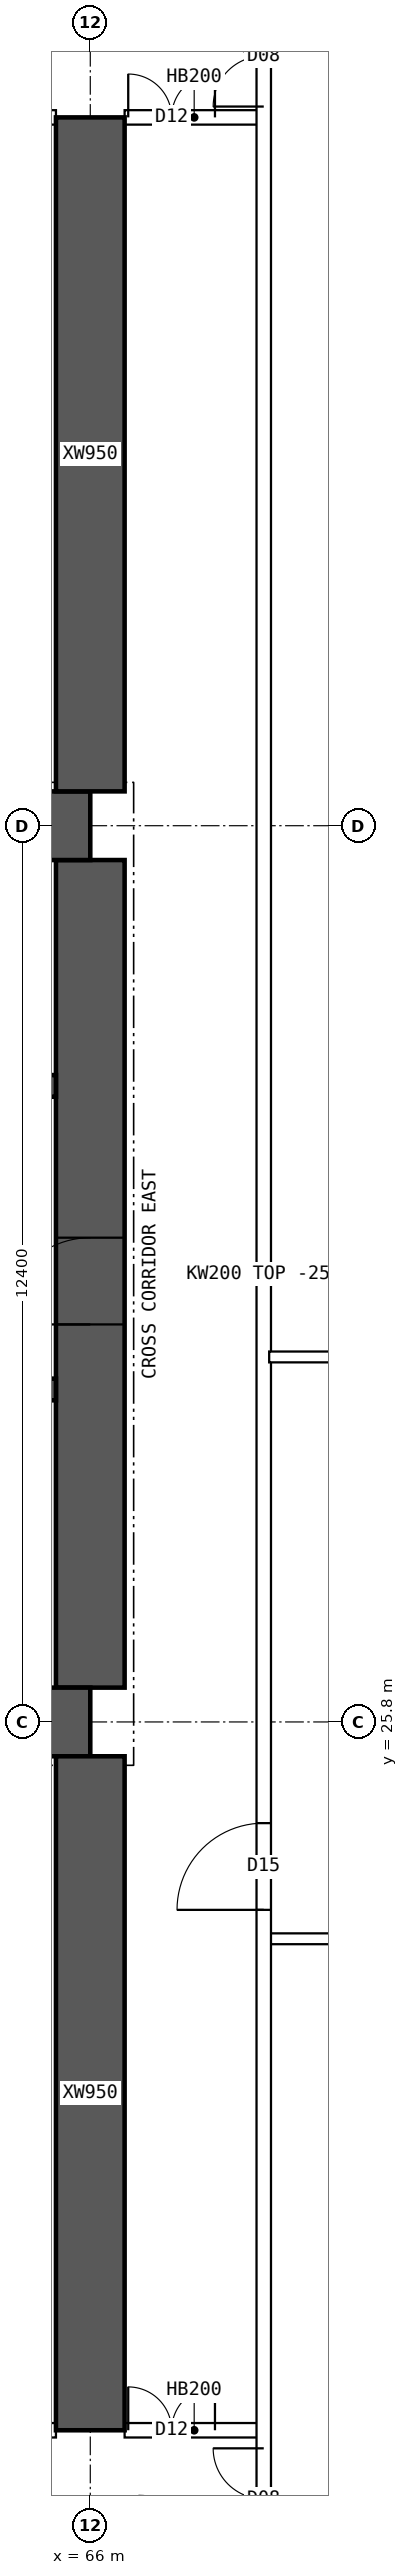
"""IFC4 building model, lengths in metres.
Left out: names, types, materials, properties, quantities, classifications, styles, units other than length and angle.
Written with IfcOpenShell. Run it as: python <this file> out.ifc"""

import sys

from ifc_helpers import new_model, si_unit, direction, frame, frame_2d, origin, place, context, subcontext, project, spatial, polyline, rectangle, outline, extrude, element, fill, save


model = new_model("IFC4")
c1 = context("Model", 3, precision=1e-05, world=origin(), true_north=direction((0.0, 1.0)))
c2 = subcontext(c1, "Body", "Model", "MODEL_VIEW")
j1 = project(units=[si_unit("LENGTHUNIT", "METRE"), si_unit("PLANEANGLEUNIT", "RADIAN")], contexts=[c1])
p1 = place(None, origin())
s1 = spatial("IfcSite", under=j1, at=p1, CompositionType="ELEMENT")
p2 = place(p1, origin())
s2 = spatial("IfcBuilding", under=s1, at=p2, CompositionType="ELEMENT")
p3 = place(p2, frame((0.0, 0.0, 121.9)))
s3 = spatial("IfcBuildingStorey", under=s2, at=p3, CompositionType="ELEMENT", Elevation=121.9)
for number, where, z_axis, x_axis in (
    (1, (18.0, 25.8, 0.0), (0.0, 0.0, 1.0), (1.0, 0.0, 0.0)),
    (2, (18.0, 38.2, 0.0), (0.0, 0.0, 1.0), (1.0, 0.0, 0.0)),
):
    element("IfcWall", number, at=place(p3, frame(where, z_axis=z_axis, x_axis=x_axis)), inside=s3, PredefinedType="SHEAR", context=c2, shape_type="SweptSolid", body=[
        extrude(rectangle(XDim=48.0, YDim=0.95, at=frame_2d((24.0, 0.0))), origin(), (0.0, 0.0, 1.0), 3.75),
    ])
p4 = place(p3, frame((66.0, 26.275, 0.0), z_axis=(0.0, 0.0, 1.0), x_axis=(0.0, 1.0, 0.0)))
e3 = element("IfcWall", 3, at=p4, inside=s3, PredefinedType="SHEAR", context=c2, shape_type="SweptSolid", body=[
    extrude(rectangle(XDim=11.45, YDim=0.95, at=frame_2d((5.725, 0.0))), origin(), (0.0, 0.0, 1.0), 3.75),
])
p5 = place(p4, frame((5.025, 0.0, 0.0)))
e4 = element("IfcOpeningElement", 4, at=p5, cuts=e3, PredefinedType="OPENING", context=c2, shape_type="SweptSolid", body=[
    extrude(rectangle(XDim=1.2, YDim=2.1, at=frame_2d((0.6, 1.05))), frame((0.0, 0.485, 0.0), z_axis=(0.0, -1.0, 0.0), x_axis=(1.0, 0.0, 0.0)), (0.0, 0.0, 1.0), 0.97),
])
p6 = place(p3, frame((18.475, 30.4, 0.0), z_axis=(0.0, 0.0, 1.0), x_axis=(1.0, 0.0, 0.0)))
e5 = element("IfcWall", 5, at=p6, inside=s3, PredefinedType="SHEAR", context=c2, shape_type="SweptSolid", body=[
    extrude(rectangle(XDim=47.05, YDim=0.3, at=frame_2d((23.525, 0.0))), origin(), (0.0, 0.0, 1.0), 3.75),
])
p7 = place(p6, frame((0.4, 0.0, 0.0)))
e6 = element("IfcOpeningElement", 6, at=p7, cuts=e5, PredefinedType="OPENING", context=c2, shape_type="SweptSolid", body=[
    extrude(rectangle(XDim=1.0, YDim=2.1, at=frame_2d((0.5, 1.05))), frame((0.0, 0.16, 0.0), z_axis=(0.0, -1.0, 0.0), x_axis=(1.0, 0.0, 0.0)), (0.0, 0.0, 1.0), 0.32),
])
p8 = place(p6, frame((45.65, 0.0, 0.0)))
e7 = element("IfcOpeningElement", 7, at=p8, cuts=e5, PredefinedType="OPENING", context=c2, shape_type="SweptSolid", body=[
    extrude(rectangle(XDim=1.0, YDim=2.1, at=frame_2d((0.5, 1.05))), frame((0.0, 0.16, 0.0), z_axis=(0.0, -1.0, 0.0), x_axis=(1.0, 0.0, 0.0)), (0.0, 0.0, 1.0), 0.32),
])
p9 = place(p6, frame((8.275, 0.0, 0.0)))
e8 = element("IfcOpeningElement", 8, at=p9, cuts=e5, PredefinedType="OPENING", context=c2, shape_type="SweptSolid", body=[
    extrude(rectangle(XDim=1.1, YDim=2.1, at=frame_2d((0.55, 1.05))), frame((0.0, 0.16, 0.0), z_axis=(0.0, -1.0, 0.0), x_axis=(1.0, 0.0, 0.0)), (0.0, 0.0, 1.0), 0.32),
])
p10 = place(p6, frame((10.875, 0.0, 0.0)))
e9 = element("IfcOpeningElement", 9, at=p10, cuts=e5, PredefinedType="OPENING", context=c2, shape_type="SweptSolid", body=[
    extrude(rectangle(XDim=1.1, YDim=2.1, at=frame_2d((0.55, 1.05))), frame((0.0, 0.16, 0.0), z_axis=(0.0, -1.0, 0.0), x_axis=(1.0, 0.0, 0.0)), (0.0, 0.0, 1.0), 0.32),
])
p11 = place(p6, frame((13.475, 0.0, 0.0)))
e10 = element("IfcOpeningElement", 10, at=p11, cuts=e5, PredefinedType="OPENING", context=c2, shape_type="SweptSolid", body=[
    extrude(rectangle(XDim=1.1, YDim=2.1, at=frame_2d((0.55, 1.05))), frame((0.0, 0.16, 0.0), z_axis=(0.0, -1.0, 0.0), x_axis=(1.0, 0.0, 0.0)), (0.0, 0.0, 1.0), 0.32),
])
p12 = place(p6, frame((16.075, 0.0, 0.0)))
e11 = element("IfcOpeningElement", 11, at=p12, cuts=e5, PredefinedType="OPENING", context=c2, shape_type="SweptSolid", body=[
    extrude(rectangle(XDim=1.1, YDim=2.1, at=frame_2d((0.55, 1.05))), frame((0.0, 0.16, 0.0), z_axis=(0.0, -1.0, 0.0), x_axis=(1.0, 0.0, 0.0)), (0.0, 0.0, 1.0), 0.32),
])
p13 = place(p6, frame((18.85, 0.0, 0.0)))
e12 = element("IfcOpeningElement", 12, at=p13, cuts=e5, PredefinedType="OPENING", context=c2, shape_type="SweptSolid", body=[
    extrude(rectangle(XDim=0.9, YDim=2.1, at=frame_2d((0.45, 1.05))), frame((0.0, 0.16, 0.0), z_axis=(0.0, -1.0, 0.0), x_axis=(1.0, 0.0, 0.0)), (0.0, 0.0, 1.0), 0.32),
])
p14 = place(p6, frame((30.142, 0.0, 0.0)))
e13 = element("IfcOpeningElement", 13, at=p14, cuts=e5, PredefinedType="OPENING", context=c2, shape_type="SweptSolid", body=[
    extrude(rectangle(XDim=1.1, YDim=2.1, at=frame_2d((0.55, 1.05))), frame((0.0, 0.16, 0.0), z_axis=(0.0, -1.0, 0.0), x_axis=(1.0, 0.0, 0.0)), (0.0, 0.0, 1.0), 0.32),
])
p15 = place(p6, frame((33.675, 0.0, 0.0)))
e14 = element("IfcOpeningElement", 14, at=p15, cuts=e5, PredefinedType="OPENING", context=c2, shape_type="SweptSolid", body=[
    extrude(rectangle(XDim=1.1, YDim=2.1, at=frame_2d((0.55, 1.05))), frame((0.0, 0.16, 0.0), z_axis=(0.0, -1.0, 0.0), x_axis=(1.0, 0.0, 0.0)), (0.0, 0.0, 1.0), 0.32),
])
p16 = place(p6, frame((37.208, 0.0, 0.0)))
e15 = element("IfcOpeningElement", 15, at=p16, cuts=e5, PredefinedType="OPENING", context=c2, shape_type="SweptSolid", body=[
    extrude(rectangle(XDim=1.1, YDim=2.1, at=frame_2d((0.55, 1.05))), frame((0.0, 0.16, 0.0), z_axis=(0.0, -1.0, 0.0), x_axis=(1.0, 0.0, 0.0)), (0.0, 0.0, 1.0), 0.32),
])
p17 = place(p3, frame((18.475, 34.6, 0.0), z_axis=(0.0, 0.0, 1.0), x_axis=(1.0, 0.0, 0.0)))
e16 = element("IfcWall", 16, at=p17, inside=s3, PredefinedType="SHEAR", context=c2, shape_type="SweptSolid", body=[
    extrude(rectangle(XDim=47.05, YDim=0.3, at=frame_2d((23.525, 0.0))), origin(), (0.0, 0.0, 1.0), 3.75),
])
p18 = place(p17, frame((0.9, 0.0, 0.0)))
e17 = element("IfcOpeningElement", 17, at=p18, cuts=e16, PredefinedType="OPENING", context=c2, shape_type="SweptSolid", body=[
    extrude(rectangle(XDim=1.1, YDim=2.1, at=frame_2d((0.55, 1.05))), frame((0.0, 0.16, 0.0), z_axis=(0.0, -1.0, 0.0), x_axis=(1.0, 0.0, 0.0)), (0.0, 0.0, 1.0), 0.32),
])
p19 = place(p17, frame((45.05, 0.0, 0.0)))
e18 = element("IfcOpeningElement", 18, at=p19, cuts=e16, PredefinedType="OPENING", context=c2, shape_type="SweptSolid", body=[
    extrude(rectangle(XDim=1.1, YDim=2.1, at=frame_2d((0.55, 1.05))), frame((0.0, 0.16, 0.0), z_axis=(0.0, -1.0, 0.0), x_axis=(1.0, 0.0, 0.0)), (0.0, 0.0, 1.0), 0.32),
])
p20 = place(p17, frame((4.125, 0.0, 0.0)))
e19 = element("IfcOpeningElement", 19, at=p20, cuts=e16, PredefinedType="OPENING", context=c2, shape_type="SweptSolid", body=[
    extrude(rectangle(XDim=0.9, YDim=2.1, at=frame_2d((0.45, 1.05))), frame((0.0, 0.16, 0.0), z_axis=(0.0, -1.0, 0.0), x_axis=(1.0, 0.0, 0.0)), (0.0, 0.0, 1.0), 0.32),
])
p21 = place(p17, frame((42.025, 0.0, 0.0)))
e20 = element("IfcOpeningElement", 20, at=p21, cuts=e16, PredefinedType="OPENING", context=c2, shape_type="SweptSolid", body=[
    extrude(rectangle(XDim=0.9, YDim=2.1, at=frame_2d((0.45, 1.05))), frame((0.0, 0.16, 0.0), z_axis=(0.0, -1.0, 0.0), x_axis=(1.0, 0.0, 0.0)), (0.0, 0.0, 1.0), 0.32),
])
p22 = place(p17, frame((8.9, 0.0, 0.0)))
e21 = element("IfcOpeningElement", 21, at=p22, cuts=e16, PredefinedType="OPENING", context=c2, shape_type="SweptSolid", body=[
    extrude(rectangle(XDim=0.9, YDim=2.1, at=frame_2d((0.45, 1.05))), frame((0.0, 0.16, 0.0), z_axis=(0.0, -1.0, 0.0), x_axis=(1.0, 0.0, 0.0)), (0.0, 0.0, 1.0), 0.32),
])
p23 = place(p17, frame((12.874, 0.0, 0.0)))
e22 = element("IfcOpeningElement", 22, at=p23, cuts=e16, PredefinedType="OPENING", context=c2, shape_type="SweptSolid", body=[
    extrude(rectangle(XDim=0.9, YDim=2.1, at=frame_2d((0.45, 1.05))), frame((0.0, 0.16, 0.0), z_axis=(0.0, -1.0, 0.0), x_axis=(1.0, 0.0, 0.0)), (0.0, 0.0, 1.0), 0.32),
])
p24 = place(p17, frame((16.521, 0.0, 0.0)))
e23 = element("IfcOpeningElement", 23, at=p24, cuts=e16, PredefinedType="OPENING", context=c2, shape_type="SweptSolid", body=[
    extrude(rectangle(XDim=0.9, YDim=2.1, at=frame_2d((0.45, 1.05))), frame((0.0, 0.16, 0.0), z_axis=(0.0, -1.0, 0.0), x_axis=(1.0, 0.0, 0.0)), (0.0, 0.0, 1.0), 0.32),
])
p25 = place(p17, frame((20.28, 0.0, 0.0)))
e24 = element("IfcOpeningElement", 24, at=p25, cuts=e16, PredefinedType="OPENING", context=c2, shape_type="SweptSolid", body=[
    extrude(rectangle(XDim=0.9, YDim=2.1, at=frame_2d((0.45, 1.05))), frame((0.0, 0.16, 0.0), z_axis=(0.0, -1.0, 0.0), x_axis=(1.0, 0.0, 0.0)), (0.0, 0.0, 1.0), 0.32),
])
p26 = place(p17, frame((24.686, 0.0, 0.0)))
e25 = element("IfcOpeningElement", 25, at=p26, cuts=e16, PredefinedType="OPENING", context=c2, shape_type="SweptSolid", body=[
    extrude(rectangle(XDim=0.9, YDim=2.1, at=frame_2d((0.45, 1.05))), frame((0.0, 0.16, 0.0), z_axis=(0.0, -1.0, 0.0), x_axis=(1.0, 0.0, 0.0)), (0.0, 0.0, 1.0), 0.32),
])
p27 = place(p17, frame((27.483, 0.0, 0.0)))
e26 = element("IfcOpeningElement", 26, at=p27, cuts=e16, PredefinedType="OPENING", context=c2, shape_type="SweptSolid", body=[
    extrude(rectangle(XDim=0.9, YDim=2.1, at=frame_2d((0.45, 1.05))), frame((0.0, 0.16, 0.0), z_axis=(0.0, -1.0, 0.0), x_axis=(1.0, 0.0, 0.0)), (0.0, 0.0, 1.0), 0.32),
])
p28 = place(p17, frame((29.45, 0.0, 0.0)))
e27 = element("IfcOpeningElement", 27, at=p28, cuts=e16, PredefinedType="OPENING", context=c2, shape_type="SweptSolid", body=[
    extrude(rectangle(XDim=0.9, YDim=2.1, at=frame_2d((0.45, 1.05))), frame((0.0, 0.16, 0.0), z_axis=(0.0, -1.0, 0.0), x_axis=(1.0, 0.0, 0.0)), (0.0, 0.0, 1.0), 0.32),
])
p29 = place(p17, frame((31.882, 0.0, 0.0)))
e28 = element("IfcOpeningElement", 28, at=p29, cuts=e16, PredefinedType="OPENING", context=c2, shape_type="SweptSolid", body=[
    extrude(rectangle(XDim=0.9, YDim=2.1, at=frame_2d((0.45, 1.05))), frame((0.0, 0.16, 0.0), z_axis=(0.0, -1.0, 0.0), x_axis=(1.0, 0.0, 0.0)), (0.0, 0.0, 1.0), 0.32),
])
p30 = place(p17, frame((34.617, 0.0, 0.0)))
e29 = element("IfcOpeningElement", 29, at=p30, cuts=e16, PredefinedType="OPENING", context=c2, shape_type="SweptSolid", body=[
    extrude(rectangle(XDim=0.9, YDim=2.1, at=frame_2d((0.45, 1.05))), frame((0.0, 0.16, 0.0), z_axis=(0.0, -1.0, 0.0), x_axis=(1.0, 0.0, 0.0)), (0.0, 0.0, 1.0), 0.32),
])
p31 = place(p17, frame((37.656, 0.0, 0.0)))
e30 = element("IfcOpeningElement", 30, at=p31, cuts=e16, PredefinedType="OPENING", context=c2, shape_type="SweptSolid", body=[
    extrude(rectangle(XDim=0.9, YDim=2.1, at=frame_2d((0.45, 1.05))), frame((0.0, 0.16, 0.0), z_axis=(0.0, -1.0, 0.0), x_axis=(1.0, 0.0, 0.0)), (0.0, 0.0, 1.0), 0.32),
])
for number, where, z_axis, x_axis in (
    (31, (66.0, 16.0, 0.0), (0.0, 0.0, 1.0), (0.0, 1.0, 0.0)),
    (32, (66.0, 38.675, 0.0), (0.0, 0.0, 1.0), (0.0, 1.0, 0.0)),
):
    element("IfcWall", number, at=place(p3, frame(where, z_axis=z_axis, x_axis=x_axis)), inside=s3, PredefinedType="SHEAR", context=c2, shape_type="SweptSolid", body=[
        extrude(rectangle(XDim=9.325, YDim=0.95, at=frame_2d((4.663, 0.0))), origin(), (0.0, 0.0, 1.0), 3.75),
    ])
p32 = place(p3, frame((60.475, 16.0, 0.0), z_axis=(0.0, 0.0, 1.0), x_axis=(1.0, 0.0, 0.0)))
e33 = element("IfcWall", 33, at=p32, inside=s3, PredefinedType="SOLIDWALL", context=c2, shape_type="SweptSolid", body=[
    extrude(rectangle(XDim=5.05, YDim=0.2, at=frame_2d((2.525, 0.0))), origin(), (0.0, 0.0, 1.0), 3.5),
])
p33 = place(p32, frame((0.15, 0.0, 0.0)))
e34 = element("IfcOpeningElement", 34, at=p33, cuts=e33, PredefinedType="OPENING", context=c2, shape_type="SweptSolid", body=[
    extrude(rectangle(XDim=0.9, YDim=2.1, at=frame_2d((0.45, 1.05))), frame((0.0, 0.11, 0.0), z_axis=(0.0, -1.0, 0.0), x_axis=(1.0, 0.0, 0.0)), (0.0, 0.0, 1.0), 0.22),
])
p34 = place(p32, frame((3.235, 0.0, 0.0)))
e35 = element("IfcOpeningElement", 35, at=p34, cuts=e33, PredefinedType="OPENING", context=c2, shape_type="SweptSolid", body=[
    extrude(rectangle(XDim=0.9, YDim=2.1, at=frame_2d((0.45, 1.05))), frame((0.0, 0.11, 0.0), z_axis=(0.0, -1.0, 0.0), x_axis=(1.0, 0.0, 0.0)), (0.0, 0.0, 1.0), 0.22),
])
p35 = place(p3, frame((66.475, 16.0, 0.0), z_axis=(0.0, 0.0, 1.0), x_axis=(1.0, 0.0, 0.0)))
e36 = element("IfcWall", 36, at=p35, inside=s3, PredefinedType="SOLIDWALL", context=c2, shape_type="SweptSolid", body=[
    extrude(rectangle(XDim=1.925, YDim=0.2, at=frame_2d((0.962, 0.0))), origin(), (0.0, 0.0, 1.0), 3.5),
])
p36 = place(p35, frame((0.05, 0.0, 0.0)))
e37 = element("IfcOpeningElement", 37, at=p36, cuts=e36, PredefinedType="OPENING", context=c2, shape_type="SweptSolid", body=[
    extrude(rectangle(XDim=1.2, YDim=2.1, at=frame_2d((0.6, 1.05))), frame((0.0, 0.11, 0.0), z_axis=(0.0, -1.0, 0.0), x_axis=(1.0, 0.0, 0.0)), (0.0, 0.0, 1.0), 0.22),
])
p37 = place(p3, frame((60.475, 48.0, 0.0), z_axis=(0.0, 0.0, 1.0), x_axis=(1.0, 0.0, 0.0)))
e38 = element("IfcWall", 38, at=p37, inside=s3, PredefinedType="SOLIDWALL", context=c2, shape_type="SweptSolid", body=[
    extrude(rectangle(XDim=5.05, YDim=0.2, at=frame_2d((2.525, 0.0))), origin(), (0.0, 0.0, 1.0), 3.5),
])
p38 = place(p37, frame((0.15, 0.0, 0.0)))
e39 = element("IfcOpeningElement", 39, at=p38, cuts=e38, PredefinedType="OPENING", context=c2, shape_type="SweptSolid", body=[
    extrude(rectangle(XDim=0.9, YDim=2.1, at=frame_2d((0.45, 1.05))), frame((0.0, 0.11, 0.0), z_axis=(0.0, -1.0, 0.0), x_axis=(1.0, 0.0, 0.0)), (0.0, 0.0, 1.0), 0.22),
])
p39 = place(p37, frame((3.285, 0.0, 0.0)))
e40 = element("IfcOpeningElement", 40, at=p39, cuts=e38, PredefinedType="OPENING", context=c2, shape_type="SweptSolid", body=[
    extrude(rectangle(XDim=0.9, YDim=2.1, at=frame_2d((0.45, 1.05))), frame((0.0, 0.11, 0.0), z_axis=(0.0, -1.0, 0.0), x_axis=(1.0, 0.0, 0.0)), (0.0, 0.0, 1.0), 0.22),
])
p40 = place(p3, frame((66.475, 48.0, 0.0), z_axis=(0.0, 0.0, 1.0), x_axis=(1.0, 0.0, 0.0)))
e41 = element("IfcWall", 41, at=p40, inside=s3, PredefinedType="SOLIDWALL", context=c2, shape_type="SweptSolid", body=[
    extrude(rectangle(XDim=1.925, YDim=0.2, at=frame_2d((0.962, 0.0))), origin(), (0.0, 0.0, 1.0), 3.5),
])
p41 = place(p40, frame((0.05, 0.0, 0.0)))
e42 = element("IfcOpeningElement", 42, at=p41, cuts=e41, PredefinedType="OPENING", context=c2, shape_type="SweptSolid", body=[
    extrude(rectangle(XDim=1.2, YDim=2.1, at=frame_2d((0.6, 1.05))), frame((0.0, 0.11, 0.0), z_axis=(0.0, -1.0, 0.0), x_axis=(1.0, 0.0, 0.0)), (0.0, 0.0, 1.0), 0.22),
])
p42 = place(p3, frame((68.475, 30.85, 0.0), z_axis=(0.0, 0.0, 1.0), x_axis=(1.0, 0.0, 0.0)))
e43 = element("IfcWall", 43, at=p42, inside=s3, PredefinedType="PARTITIONING", context=c2, shape_type="SweptSolid", body=[
    extrude(outline(polyline([(0.0, 0.0), (6.82, 0.0), (6.82, 3.5), (3.827, 3.5), (3.825, 3.05), (3.227, 3.05), (3.225, 3.5), (0.0, 3.5), (0.0, 0.0)])), frame((0.0, 0.075, 0.0), z_axis=(0.0, -1.0, 0.0), x_axis=(1.0, 0.0, 0.0)), (0.0, 0.0, 1.0), 0.15),
])
p43 = place(p3, frame((68.4, 9.405, 0.0), z_axis=(0.0, 0.0, 1.0), x_axis=(0.0, 1.0, 0.0)))
e44 = element("IfcWall", 44, at=p43, inside=s3, PredefinedType="SOLIDWALL", context=c2, shape_type="SweptSolid", body=[
    extrude(rectangle(XDim=45.189, YDim=0.2, at=frame_2d((22.595, 0.0))), origin(), (0.0, 0.0, 1.0), 3.5),
])
p44 = place(p43, frame((13.795, 0.0, 0.0)))
e45 = element("IfcOpeningElement", 45, at=p44, cuts=e44, PredefinedType="OPENING", context=c2, shape_type="SweptSolid", body=[
    extrude(rectangle(XDim=1.2, YDim=2.1, at=frame_2d((0.6, 1.05))), frame((0.0, 0.11, 0.0), z_axis=(0.0, -1.0, 0.0), x_axis=(1.0, 0.0, 0.0)), (0.0, 0.0, 1.0), 0.22),
])
p45 = place(p43, frame((4.945, 0.0, 0.0)))
e46 = element("IfcOpeningElement", 46, at=p45, cuts=e44, PredefinedType="OPENING", context=c2, shape_type="SweptSolid", body=[
    extrude(rectangle(XDim=1.4, YDim=2.1, at=frame_2d((0.7, 1.05))), frame((0.0, 0.11, 0.0), z_axis=(0.0, -1.0, 0.0), x_axis=(1.0, 0.0, 0.0)), (0.0, 0.0, 1.0), 0.22),
])
p46 = place(p43, frame((38.745, 0.0, 0.0)))
e47 = element("IfcOpeningElement", 47, at=p46, cuts=e44, PredefinedType="OPENING", context=c2, shape_type="SweptSolid", body=[
    extrude(rectangle(XDim=1.4, YDim=2.1, at=frame_2d((0.7, 1.05))), frame((0.0, 0.11, 0.0), z_axis=(0.0, -1.0, 0.0), x_axis=(1.0, 0.0, 0.0)), (0.0, 0.0, 1.0), 0.22),
])
p47 = place(p3, frame((68.475, 22.8, 0.0), z_axis=(0.0, 0.0, 1.0), x_axis=(1.0, 0.0, 0.0)))
e48 = element("IfcWall", 48, at=p47, inside=s3, PredefinedType="PARTITIONING", context=c2, shape_type="SweptSolid", body=[
    extrude(outline(polyline([(0.0, 0.0), (6.82, 0.0), (6.82, 3.5), (3.827, 3.5), (3.825, 3.05), (3.227, 3.05), (3.225, 3.5), (0.0, 3.5), (0.0, 0.0)])), frame((0.0, 0.075, 0.0), z_axis=(0.0, -1.0, 0.0), x_axis=(1.0, 0.0, 0.0)), (0.0, 0.0, 1.0), 0.15),
])
p48 = place(p5, origin())
e49 = element("IfcDoor", 49, at=p48, inside=s3, OperationType="SINGLE_SWING_LEFT", PredefinedType="DOOR", context=c2, shape_type="SweptSolid", body=[
    extrude(rectangle(XDim=1.2, YDim=2.1, at=frame_2d((0.6, 1.05))), frame((0.0, 0.025, 0.0), z_axis=(0.0, -1.0, 0.0), x_axis=(1.0, 0.0, 0.0)), (0.0, 0.0, 1.0), 0.05),
])
fill(e4, e49)
p49 = place(p36, origin())
e50 = element("IfcDoor", 50, at=p49, inside=s3, OperationType="DOUBLE_DOOR_SINGLE_SWING", PredefinedType="DOOR", context=c2, shape_type="SweptSolid", body=[
    extrude(rectangle(XDim=1.2, YDim=2.1, at=frame_2d((0.6, 1.05))), frame((0.0, 0.025, 0.0), z_axis=(0.0, -1.0, 0.0), x_axis=(1.0, 0.0, 0.0)), (0.0, 0.0, 1.0), 0.05),
])
fill(e37, e50)
p50 = place(p41, origin())
e51 = element("IfcDoor", 51, at=p50, inside=s3, OperationType="DOUBLE_DOOR_SINGLE_SWING", PredefinedType="DOOR", context=c2, shape_type="SweptSolid", body=[
    extrude(rectangle(XDim=1.2, YDim=2.1, at=frame_2d((0.6, 1.05))), frame((0.0, 0.025, 0.0), z_axis=(0.0, -1.0, 0.0), x_axis=(1.0, 0.0, 0.0)), (0.0, 0.0, 1.0), 0.05),
])
fill(e42, e51)
p51 = place(p44, origin())
e52 = element("IfcDoor", 52, at=p51, inside=s3, OperationType="SINGLE_SWING_LEFT", PredefinedType="DOOR", context=c2, shape_type="SweptSolid", body=[
    extrude(rectangle(XDim=1.2, YDim=2.1, at=frame_2d((0.6, 1.05))), frame((0.0, 0.025, 0.0), z_axis=(0.0, -1.0, 0.0), x_axis=(1.0, 0.0, 0.0)), (0.0, 0.0, 1.0), 0.05),
])
fill(e45, e52)
p52 = place(p45, origin())
e53 = element("IfcDoor", 53, at=p52, inside=s3, OperationType="DOUBLE_DOOR_SINGLE_SWING", PredefinedType="DOOR", context=c2, shape_type="SweptSolid", body=[
    extrude(rectangle(XDim=1.4, YDim=2.1, at=frame_2d((0.7, 1.05))), frame((0.0, 0.025, 0.0), z_axis=(0.0, -1.0, 0.0), x_axis=(1.0, 0.0, 0.0)), (0.0, 0.0, 1.0), 0.05),
])
fill(e46, e53)
p53 = place(p46, origin())
e54 = element("IfcDoor", 54, at=p53, inside=s3, OperationType="DOUBLE_DOOR_SINGLE_SWING", PredefinedType="DOOR", context=c2, shape_type="SweptSolid", body=[
    extrude(rectangle(XDim=1.4, YDim=2.1, at=frame_2d((0.7, 1.05))), frame((0.0, 0.025, 0.0), z_axis=(0.0, -1.0, 0.0), x_axis=(1.0, 0.0, 0.0)), (0.0, 0.0, 1.0), 0.05),
])
fill(e47, e54)
save(model, sys.argv[1])
